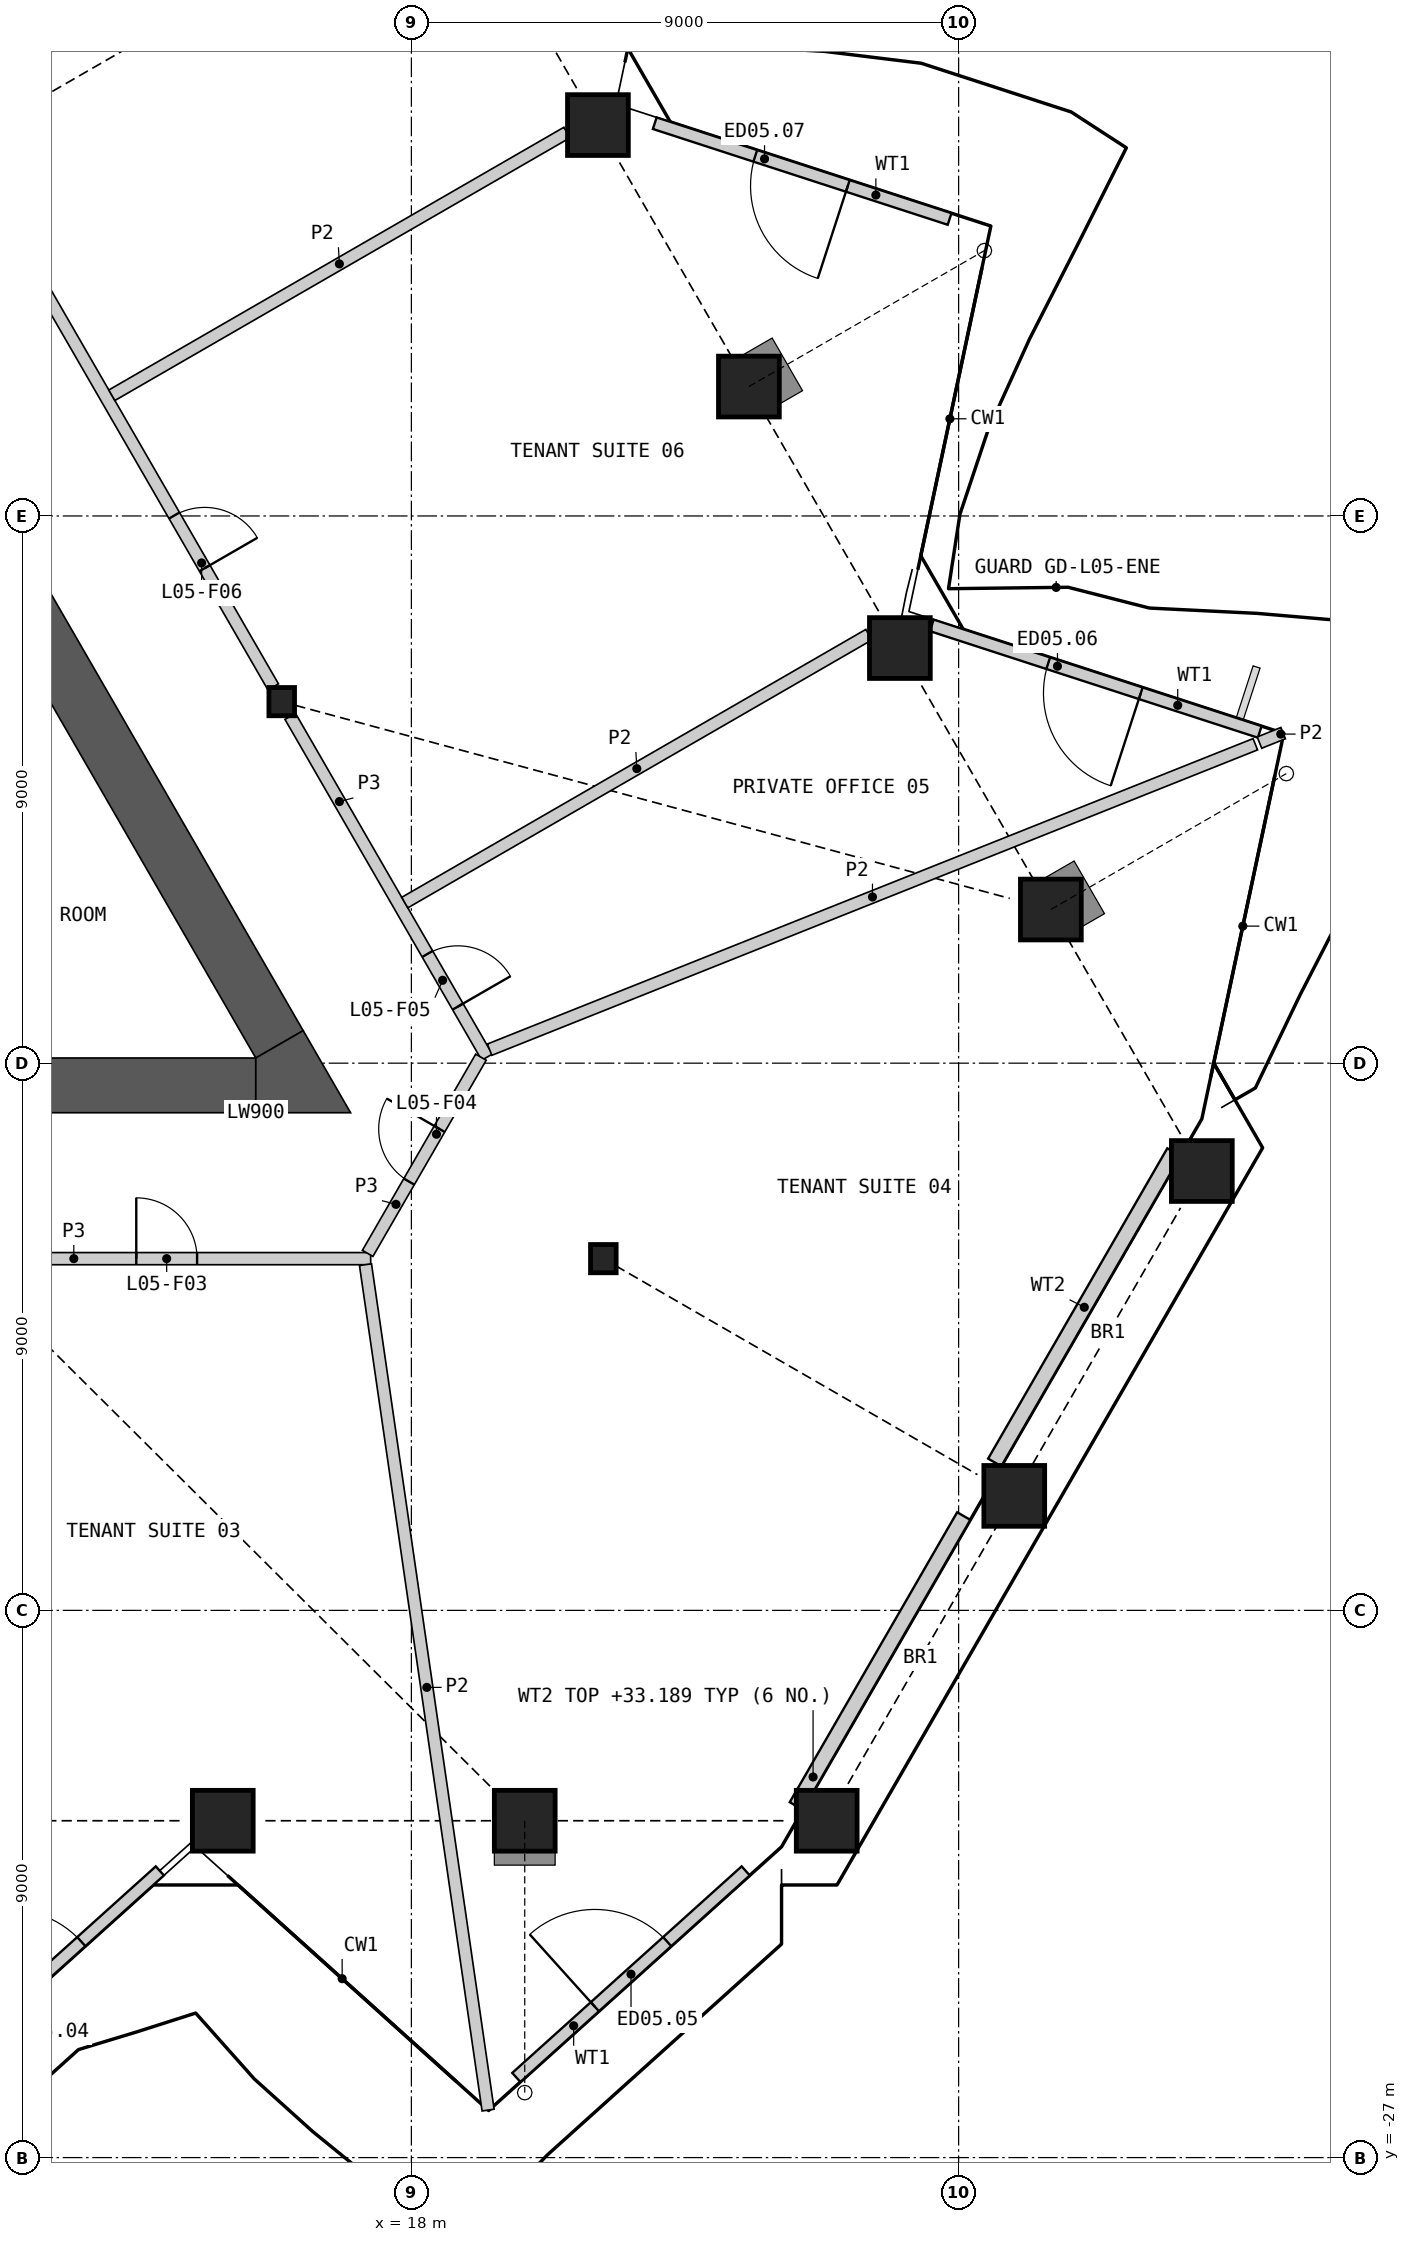
"""IFC4 building model, lengths in metres.
Left out: names, types, materials, properties, quantities, classifications, styles, units other than length and angle.
Written with IfcOpenShell. Run it as: python <this file> out.ifc"""

import sys

from ifc_helpers import new_model, si_unit, direction, frame, frame_2d, origin, origin_2d, place, context, subcontext, project, spatial, polyline, rectangle, hollow_rectangle, i_section, outline, extrude, element, fill, save


model = new_model("IFC4")
c1 = context("Model", 3, precision=1e-05, world=origin(), true_north=direction((0.0, 1.0)))
c2 = subcontext(c1, "Body", "Model", "MODEL_VIEW")
j1 = project(units=[si_unit("LENGTHUNIT", "METRE"), si_unit("PLANEANGLEUNIT", "RADIAN")], contexts=[c1])
p1 = place(None, origin())
s1 = spatial("IfcSite", under=j1, at=p1, CompositionType="ELEMENT")
p2 = place(p1, origin())
s2 = spatial("IfcBuilding", under=s1, at=p2, CompositionType="ELEMENT")
p3 = place(p2, frame((0.0, 0.0, 30.0)))
s3 = spatial("IfcBuildingStorey", under=s2, at=p3, CompositionType="ELEMENT", Elevation=30.0)
p4 = place(p3, frame((14.898, -21.46, 0.0), z_axis=(0.0, 0.0, 1.0), x_axis=(1.0, 0.0, 0.0)))
e1 = element("IfcColumn", 1, at=p4, inside=s3, PredefinedType="COLUMN", context=c2, shape_type="SweptSolid", body=[
    extrude(hollow_rectangle(XDim=1.0, YDim=1.0, WallThickness=0.07, at=origin_2d()), origin(), (0.0, 0.0, 1.0), 4.2),
])
p5 = place(p3, frame((19.864, -21.46, 0.0), z_axis=(0.0, -0.728887790527, 0.684633178293), x_axis=(1.0, 0.0, 0.0)))
e2 = element("IfcColumn", 2, at=p5, inside=s3, PredefinedType="COLUMN", context=c2, shape_type="SweptSolid", body=[
    extrude(hollow_rectangle(XDim=1.0, YDim=1.0, WallThickness=0.07, at=origin_2d()), frame((0.0, 0.0, 0.532)), (0.0, 0.0, 1.0), 5.07),
])
p6 = place(p3, frame((24.83, -21.46, 0.0), z_axis=(0.0, 0.0, 1.0), x_axis=(1.0, 0.0, 0.0)))
e3 = element("IfcColumn", 3, at=p6, inside=s3, PredefinedType="COLUMN", context=c2, shape_type="SweptSolid", body=[
    extrude(hollow_rectangle(XDim=1.0, YDim=1.0, WallThickness=0.07, at=origin_2d()), origin(), (0.0, 0.0, 1.0), 4.2),
])
p7 = place(p3, frame((27.915, -16.117, -0.4), z_axis=(0.0, 0.0, 1.0), x_axis=(1.0, 0.0, 0.0)))
e4 = element("IfcColumn", 4, at=p7, inside=s3, PredefinedType="COLUMN", context=c2, shape_type="SweptSolid", body=[
    extrude(hollow_rectangle(XDim=1.0, YDim=1.0, WallThickness=0.07, at=origin_2d()), origin(), (0.0, 0.0, 1.0), 4.6),
])
p8 = place(p3, frame((31.0, -10.774, 0.0), z_axis=(0.0, 0.0, 1.0), x_axis=(1.0, 0.0, 0.0)))
e5 = element("IfcColumn", 5, at=p8, inside=s3, PredefinedType="COLUMN", context=c2, shape_type="SweptSolid", body=[
    extrude(hollow_rectangle(XDim=1.0, YDim=1.0, WallThickness=0.07, at=origin_2d()), origin(), (0.0, 0.0, 1.0), 4.2),
])
p9 = place(p3, frame((28.517, -6.473, 0.0), z_axis=(0.631257748816, 0.364419821328, 0.684625334313), x_axis=(-0.499961918033, 0.866047389302, 0.0)))
e6 = element("IfcColumn", 6, at=p9, inside=s3, PredefinedType="COLUMN", context=c2, shape_type="SweptSolid", body=[
    extrude(hollow_rectangle(XDim=1.0, YDim=1.0, WallThickness=0.07, at=origin_2d()), frame((0.0, 0.0, 0.532)), (0.0, 0.0, 1.0), 5.07),
])
p10 = place(p3, frame((26.034, -2.172, 0.0), z_axis=(0.0, 0.0, 1.0), x_axis=(1.0, 0.0, 0.0)))
e7 = element("IfcColumn", 7, at=p10, inside=s3, PredefinedType="COLUMN", context=c2, shape_type="SweptSolid", body=[
    extrude(hollow_rectangle(XDim=1.0, YDim=1.0, WallThickness=0.07, at=origin_2d()), origin(), (0.0, 0.0, 1.0), 4.2),
])
p11 = place(p3, frame((23.551, 2.128, 0.0), z_axis=(0.631248593533, 0.36445433234, 0.684615405028), x_axis=(-0.500002867593, 0.866023748172, 0.0)))
e8 = element("IfcColumn", 8, at=p11, inside=s3, PredefinedType="COLUMN", context=c2, shape_type="SweptSolid", body=[
    extrude(hollow_rectangle(XDim=1.0, YDim=1.0, WallThickness=0.07, at=origin_2d()), frame((0.0, 0.0, 0.532)), (0.0, 0.0, 1.0), 5.07),
])
p12 = place(p3, frame((21.068, 6.429, 0.0), z_axis=(0.0, 0.0, 1.0), x_axis=(1.0, 0.0, 0.0)))
e9 = element("IfcColumn", 9, at=p12, inside=s3, PredefinedType="COLUMN", context=c2, shape_type="SweptSolid", body=[
    extrude(hollow_rectangle(XDim=1.0, YDim=1.0, WallThickness=0.07, at=origin_2d()), origin(), (0.0, 0.0, 1.0), 4.2),
])
for number, where, z_axis, x_axis in (
    (10, (21.157, -12.215, 0.0), (0.0, 0.0, 1.0), (1.0, 0.0, 0.0)),
    (11, (15.868, -3.054, 0.0), (0.0, 0.0, 1.0), (1.0, 0.0, 0.0)),
):
    element("IfcColumn", number, at=place(p3, frame(where, z_axis=z_axis, x_axis=x_axis)), inside=s3, PredefinedType="COLUMN", context=c2, shape_type="SweptSolid", body=[
        extrude(i_section(OverallWidth=0.421, OverallDepth=0.465, WebThickness=0.045, FlangeThickness=0.072, at=origin_2d()), origin(), (0.0, 0.0, 1.0), 4.2),
    ])
p13 = place(p3, frame((10.091, -25.682, 0.0), z_axis=(0.0, 0.0, 1.0), x_axis=(0.74314347906, 0.669132101704, 0.0)))
e12 = element("IfcWall", 12, at=p13, inside=s3, PredefinedType="SOLIDWALL", context=c2, shape_type="SweptSolid", body=[
    extrude(rectangle(XDim=5.077, YDim=0.2, at=frame_2d((2.538, 0.0))), origin(), (0.0, 0.0, 1.0), 3.189),
])
p14 = place(p13, frame((1.738, 0.0, 0.0)))
e13 = element("IfcOpeningElement", 13, at=p14, cuts=e12, PredefinedType="OPENING", context=c2, shape_type="SweptSolid", body=[
    extrude(rectangle(XDim=1.6, YDim=2.4, at=frame_2d((0.8, 1.2))), frame((0.0, 0.11, 0.0), z_axis=(0.0, -1.0, 0.0), x_axis=(1.0, 0.0, 0.0)), (0.0, 0.0, 1.0), 0.22),
])
p15 = place(p3, frame((19.726, -25.682, 0.0), z_axis=(0.0, 0.0, 1.0), x_axis=(0.74314347906, 0.669132101704, 0.0)))
e14 = element("IfcWall", 14, at=p15, inside=s3, PredefinedType="SOLIDWALL", context=c2, shape_type="SweptSolid", body=[
    extrude(rectangle(XDim=5.077, YDim=0.2, at=frame_2d((2.538, 0.0))), origin(), (0.0, 0.0, 1.0), 3.189),
])
p16 = place(p15, frame((1.738, 0.0, 0.0)))
e15 = element("IfcOpeningElement", 15, at=p16, cuts=e14, PredefinedType="OPENING", context=c2, shape_type="SweptSolid", body=[
    extrude(rectangle(XDim=1.6, YDim=2.4, at=frame_2d((0.8, 1.2))), frame((0.0, 0.11, 0.0), z_axis=(0.0, -1.0, 0.0), x_axis=(1.0, 0.0, 0.0)), (0.0, 0.0, 1.0), 0.22),
])
p17 = place(p3, frame((24.331, -21.217, 0.0), z_axis=(0.0, 0.0, 1.0), x_axis=(0.500006469283, 0.86602166871, 0.0)))
e16 = element("IfcWall", 16, at=p17, inside=s3, PredefinedType="SOLIDWALL", context=c2, shape_type="SweptSolid", body=[
    extrude(rectangle(XDim=5.506, YDim=0.25, at=frame_2d((2.753, 0.0))), origin(), (0.0, 0.0, 1.0), 3.189),
])
p18 = place(p3, frame((27.593, -15.567, 0.0), z_axis=(0.0, 0.0, 1.0), x_axis=(0.500010498135, 0.866019342599, 0.0)))
e17 = element("IfcWall", 17, at=p18, inside=s3, PredefinedType="SOLIDWALL", context=c2, shape_type="SweptSolid", body=[
    extrude(rectangle(XDim=5.894, YDim=0.25, at=frame_2d((2.947, 0.0))), origin(), (0.0, 0.0, 1.0), 3.189),
])
p19 = place(p3, frame((31.952, -3.552, 0.0), z_axis=(0.0, 0.0, 1.0), x_axis=(-0.951049886998, 0.309037396509, 0.0)))
e18 = element("IfcWall", 18, at=p19, inside=s3, PredefinedType="SOLIDWALL", context=c2, shape_type="SweptSolid", body=[
    extrude(rectangle(XDim=5.671, YDim=0.2, at=frame_2d((2.835, 0.0))), origin(), (0.0, 0.0, 1.0), 3.189),
])
p20 = place(p19, frame((2.057, 0.0, 0.0)))
e19 = element("IfcOpeningElement", 19, at=p20, cuts=e18, PredefinedType="OPENING", context=c2, shape_type="SweptSolid", body=[
    extrude(rectangle(XDim=1.6, YDim=2.4, at=frame_2d((0.8, 1.2))), frame((0.0, 0.11, 0.0), z_axis=(0.0, -1.0, 0.0), x_axis=(1.0, 0.0, 0.0)), (0.0, 0.0, 1.0), 0.22),
])
p21 = place(p3, frame((26.851, 4.885, 0.0), z_axis=(0.0, 0.0, 1.0), x_axis=(-0.951055181617, 0.309021102063, 0.0)))
e20 = element("IfcWall", 20, at=p21, inside=s3, PredefinedType="SOLIDWALL", context=c2, shape_type="SweptSolid", body=[
    extrude(rectangle(XDim=5.098, YDim=0.2, at=frame_2d((2.549, 0.0))), origin(), (0.0, 0.0, 1.0), 3.189),
])
p22 = place(p21, frame((1.76, 0.0, 0.0)))
e21 = element("IfcOpeningElement", 21, at=p22, cuts=e20, PredefinedType="OPENING", context=c2, shape_type="SweptSolid", body=[
    extrude(rectangle(XDim=1.6, YDim=2.4, at=frame_2d((0.8, 1.2))), frame((0.0, 0.11, 0.0), z_axis=(0.0, -1.0, 0.0), x_axis=(1.0, 0.0, 0.0)), (0.0, 0.0, 1.0), 0.22),
])
p23 = place(p3, frame((6.571, -9.365, 0.0), z_axis=(0.0, 0.0, 1.0), x_axis=(1.0, 0.0, 0.0)))
e22 = element("IfcWall", 22, at=p23, inside=s3, PredefinedType="SHEAR", context=c2, shape_type="SweptSolid", body=[
    extrude(rectangle(XDim=8.871, YDim=0.9, at=frame_2d((4.435, 0.0))), origin(), (0.0, 0.0, 1.0), 3.8),
])
p24 = place(p3, frame((15.831, -8.69, 0.0), z_axis=(0.0, 0.0, 1.0), x_axis=(-0.499997452939, 0.866026874326, 0.0)))
e23 = element("IfcWall", 23, at=p24, inside=s3, PredefinedType="SHEAR", context=c2, shape_type="SweptSolid", body=[
    extrude(rectangle(XDim=13.141, YDim=0.9, at=frame_2d((6.571, 0.0))), origin(), (0.0, 0.0, 1.0), 3.8),
])
p25 = place(p3, origin())
e24 = element("IfcWall", 24, at=p25, inside=s3, PredefinedType="SHEAR", context=c2, shape_type="SweptSolid", body=[
    extrude(outline(polyline([(15.441, -9.815), (15.441, -8.915), (16.221, -8.465), (17.0, -9.815), (15.441, -9.815)])), origin(), (0.0, 0.0, 1.0), 3.8),
])
p26 = place(p3, frame((10.719, 5.865, 0.0), z_axis=(0.0, 0.0, 1.0), x_axis=(0.49999175339, -0.866030164915, 0.0)))
e25 = element("IfcWall", 25, at=p26, inside=s3, PredefinedType="PARTITIONING", context=c2, shape_type="SweptSolid", body=[
    extrude(rectangle(XDim=10.019, YDim=0.2, at=frame_2d((5.009, 0.0))), origin(), (0.0, 0.0, 1.0), 3.8),
])
p27 = place(p26, frame((6.764, 0.0, 0.0)))
e26 = element("IfcOpeningElement", 26, at=p27, cuts=e25, PredefinedType="OPENING", context=c2, shape_type="SweptSolid", body=[
    extrude(rectangle(XDim=1.0, YDim=2.1, at=frame_2d((0.5, 1.05))), frame((0.0, 0.11, 0.0), z_axis=(0.0, -1.0, 0.0), x_axis=(1.0, 0.0, 0.0)), (0.0, 0.0, 1.0), 0.22),
])
p28 = place(p3, frame((10.821, -12.215, 0.0), z_axis=(0.0, 0.0, 1.0), x_axis=(1.0, 0.0, 0.0)))
e27 = element("IfcWall", 27, at=p28, inside=s3, PredefinedType="PARTITIONING", context=c2, shape_type="SweptSolid", body=[
    extrude(rectangle(XDim=6.51, YDim=0.2, at=frame_2d((3.255, 0.0))), origin(), (0.0, 0.0, 1.0), 3.8),
])
p29 = place(p28, frame((2.655, 0.0, 0.0)))
e28 = element("IfcOpeningElement", 28, at=p29, cuts=e27, PredefinedType="OPENING", context=c2, shape_type="SweptSolid", body=[
    extrude(rectangle(XDim=1.0, YDim=2.1, at=frame_2d((0.5, 1.05))), frame((0.0, 0.11, 0.0), z_axis=(0.0, -1.0, 0.0), x_axis=(1.0, 0.0, 0.0)), (0.0, 0.0, 1.0), 0.22),
])
p30 = place(p3, frame((16.008, -3.296, 0.0), z_axis=(0.0, 0.0, 1.0), x_axis=(0.499984737558, -0.86603421538, 0.0)))
e29 = element("IfcWall", 29, at=p30, inside=s3, PredefinedType="PARTITIONING", context=c2, shape_type="SweptSolid", body=[
    extrude(rectangle(XDim=6.473, YDim=0.2, at=frame_2d((3.236, 0.0))), origin(), (0.0, 0.0, 1.0), 3.8),
])
p31 = place(p30, frame((4.512, 0.0, 0.0)))
e30 = element("IfcOpeningElement", 30, at=p31, cuts=e29, PredefinedType="OPENING", context=c2, shape_type="SweptSolid", body=[
    extrude(rectangle(XDim=1.0, YDim=2.1, at=frame_2d((0.5, 1.05))), frame((0.0, 0.11, 0.0), z_axis=(0.0, -1.0, 0.0), x_axis=(1.0, 0.0, 0.0)), (0.0, 0.0, 1.0), 0.22),
])
p32 = place(p3, frame((17.281, -12.128, 0.0), z_axis=(0.0, 0.0, 1.0), x_axis=(0.499958791762, 0.866049194065, 0.0)))
e31 = element("IfcWall", 31, at=p32, inside=s3, PredefinedType="PARTITIONING", context=c2, shape_type="SweptSolid", body=[
    extrude(rectangle(XDim=3.726, YDim=0.2, at=frame_2d((1.863, 0.0))), origin(), (0.0, 0.0, 1.0), 3.8),
])
p33 = place(p32, frame((1.363, 0.0, 0.0)))
e32 = element("IfcOpeningElement", 32, at=p33, cuts=e31, PredefinedType="OPENING", context=c2, shape_type="SweptSolid", body=[
    extrude(rectangle(XDim=1.0, YDim=2.1, at=frame_2d((0.5, 1.05))), frame((0.0, 0.11, 0.0), z_axis=(0.0, -1.0, 0.0), x_axis=(1.0, 0.0, 0.0)), (0.0, 0.0, 1.0), 0.22),
])
p34 = place(p3, frame((17.245, -12.314, 0.0), z_axis=(0.0, 0.0, 1.0), x_axis=(0.143525263071, -0.989646653539, 0.0)))
e33 = element("IfcWall", 33, at=p34, inside=s3, PredefinedType="PARTITIONING", context=c2, shape_type="SweptSolid", body=[
    extrude(rectangle(XDim=14.051, YDim=0.2, at=frame_2d((7.025, 0.0))), origin(), (0.0, 0.0, 1.0), 2.885),
])
p35 = place(p3, frame((19.287, -8.778, 0.0), z_axis=(0.0, 0.0, 1.0), x_axis=(0.928821541656, 0.370527385973, 0.0)))
e34 = element("IfcWall", 34, at=p35, inside=s3, PredefinedType="PARTITIONING", context=c2, shape_type="SweptSolid", body=[
    extrude(rectangle(XDim=13.558, YDim=0.2, at=frame_2d((6.779, 0.0))), origin(), (0.0, 0.0, 1.0), 2.885),
])
p36 = place(p3, frame((17.891, -6.359, 0.0), z_axis=(0.0, 0.0, 1.0), x_axis=(0.866021822855, 0.500006202301, 0.0)))
e35 = element("IfcWall", 35, at=p36, inside=s3, PredefinedType="PARTITIONING", context=c2, shape_type="SweptSolid", body=[
    extrude(rectangle(XDim=8.813, YDim=0.2, at=frame_2d((4.407, 0.0))), origin(), (0.0, 0.0, 1.0), 2.885),
])
p37 = place(p3, frame((13.074, 1.985, 0.0), z_axis=(0.0, 0.0, 1.0), x_axis=(0.86602139752, 0.500006938989, 0.0)))
e36 = element("IfcWall", 36, at=p37, inside=s3, PredefinedType="PARTITIONING", context=c2, shape_type="SweptSolid", body=[
    extrude(rectangle(XDim=8.642, YDim=0.2, at=frame_2d((4.321, 0.0))), origin(), (0.0, 0.0, 1.0), 2.885),
])
p38 = place(p3, frame((31.948, -3.727, 0.0), z_axis=(0.0, 0.0, 1.0), x_axis=(0.928757356094, 0.370688243003, 0.0)))
e37 = element("IfcWall", 37, at=p38, inside=s3, PredefinedType="PARTITIONING", context=c2, shape_type="SweptSolid", body=[
    extrude(rectangle(XDim=0.419, YDim=0.2, at=frame_2d((0.21, 0.0))), origin(), (0.0, 0.0, 1.0), 2.885),
])
p39 = place(p14, origin())
e38 = element("IfcDoor", 38, at=p39, inside=s3, OperationType="DOUBLE_DOOR_SINGLE_SWING", PredefinedType="DOOR", context=c2, shape_type="SweptSolid", body=[
    extrude(rectangle(XDim=1.6, YDim=2.4, at=frame_2d((0.8, 1.2))), frame((0.0, 0.025, 0.0), z_axis=(0.0, -1.0, 0.0), x_axis=(1.0, 0.0, 0.0)), (0.0, 0.0, 1.0), 0.05),
])
fill(e13, e38)
p40 = place(p16, origin())
e39 = element("IfcDoor", 39, at=p40, inside=s3, OperationType="DOUBLE_DOOR_SINGLE_SWING", PredefinedType="DOOR", context=c2, shape_type="SweptSolid", body=[
    extrude(rectangle(XDim=1.6, YDim=2.4, at=frame_2d((0.8, 1.2))), frame((0.0, 0.025, 0.0), z_axis=(0.0, -1.0, 0.0), x_axis=(1.0, 0.0, 0.0)), (0.0, 0.0, 1.0), 0.05),
])
fill(e15, e39)
p41 = place(p20, origin())
e40 = element("IfcDoor", 40, at=p41, inside=s3, OperationType="DOUBLE_DOOR_SINGLE_SWING", PredefinedType="DOOR", context=c2, shape_type="SweptSolid", body=[
    extrude(rectangle(XDim=1.6, YDim=2.4, at=frame_2d((0.8, 1.2))), frame((0.0, 0.025, 0.0), z_axis=(0.0, -1.0, 0.0), x_axis=(1.0, 0.0, 0.0)), (0.0, 0.0, 1.0), 0.05),
])
fill(e19, e40)
p42 = place(p22, origin())
e41 = element("IfcDoor", 41, at=p42, inside=s3, OperationType="DOUBLE_DOOR_SINGLE_SWING", PredefinedType="DOOR", context=c2, shape_type="SweptSolid", body=[
    extrude(rectangle(XDim=1.6, YDim=2.4, at=frame_2d((0.8, 1.2))), frame((0.0, 0.025, 0.0), z_axis=(0.0, -1.0, 0.0), x_axis=(1.0, 0.0, 0.0)), (0.0, 0.0, 1.0), 0.05),
])
fill(e21, e41)
p43 = place(p29, origin())
e42 = element("IfcDoor", 42, at=p43, inside=s3, OperationType="SINGLE_SWING_LEFT", PredefinedType="DOOR", context=c2, shape_type="SweptSolid", body=[
    extrude(rectangle(XDim=1.0, YDim=2.1, at=frame_2d((0.5, 1.05))), frame((0.0, 0.025, 0.0), z_axis=(0.0, -1.0, 0.0), x_axis=(1.0, 0.0, 0.0)), (0.0, 0.0, 1.0), 0.05),
])
fill(e28, e42)
p44 = place(p33, origin())
e43 = element("IfcDoor", 43, at=p44, inside=s3, OperationType="SINGLE_SWING_RIGHT", PredefinedType="DOOR", context=c2, shape_type="SweptSolid", body=[
    extrude(rectangle(XDim=1.0, YDim=2.1, at=frame_2d((0.5, 1.05))), frame((0.0, 0.025, 0.0), z_axis=(0.0, -1.0, 0.0), x_axis=(1.0, 0.0, 0.0)), (0.0, 0.0, 1.0), 0.05),
])
fill(e32, e43)
p45 = place(p31, origin())
e44 = element("IfcDoor", 44, at=p45, inside=s3, OperationType="SINGLE_SWING_RIGHT", PredefinedType="DOOR", context=c2, shape_type="SweptSolid", body=[
    extrude(rectangle(XDim=1.0, YDim=2.1, at=frame_2d((0.5, 1.05))), frame((0.0, 0.025, 0.0), z_axis=(0.0, -1.0, 0.0), x_axis=(1.0, 0.0, 0.0)), (0.0, 0.0, 1.0), 0.05),
])
fill(e30, e44)
p46 = place(p27, origin())
e45 = element("IfcDoor", 45, at=p46, inside=s3, OperationType="SINGLE_SWING_RIGHT", PredefinedType="DOOR", context=c2, shape_type="SweptSolid", body=[
    extrude(rectangle(XDim=1.0, YDim=2.1, at=frame_2d((0.5, 1.05))), frame((0.0, 0.025, 0.0), z_axis=(0.0, -1.0, 0.0), x_axis=(1.0, 0.0, 0.0)), (0.0, 0.0, 1.0), 0.05),
])
fill(e26, e45)
save(model, sys.argv[1])
